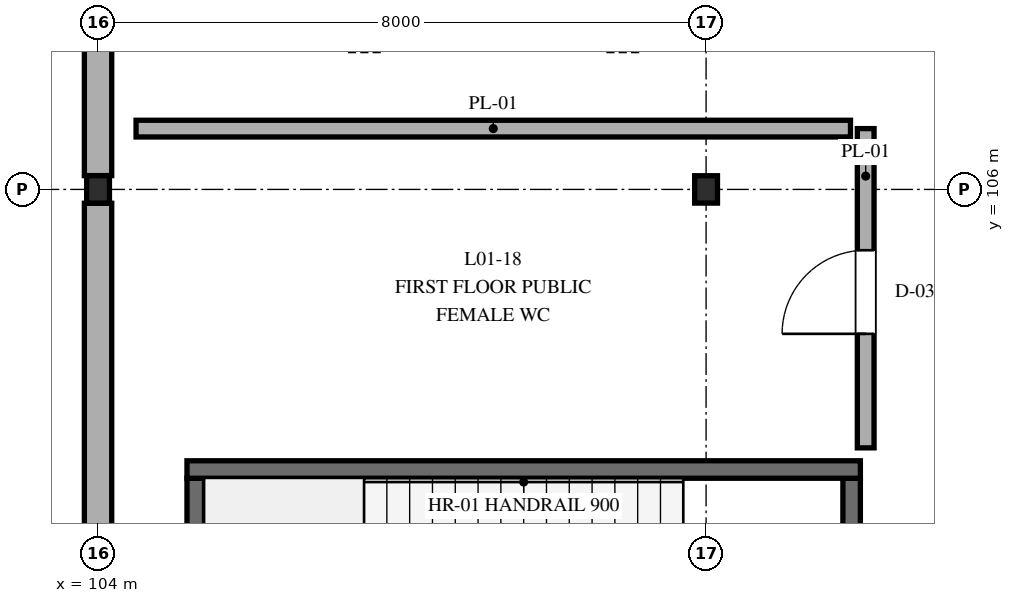
"""IFC4 building model, lengths in metres.
Left out: names, types, materials, properties, quantities, classifications, styles, units other than length and angle.
Written with IfcOpenShell. Run it as: python <this file> out.ifc"""

import sys

from ifc_helpers import new_model, si_unit, direction, frame, frame_2d, origin, origin_2d, place, context, subcontext, project, spatial, rectangle, i_section, extrude, element, fill, save


model = new_model("IFC4")
c1 = context("Model", 3, precision=1e-05, world=origin(), true_north=direction((0.0, 1.0)))
c2 = subcontext(c1, "Body", "Model", "MODEL_VIEW")
j1 = project(units=[si_unit("LENGTHUNIT", "METRE"), si_unit("PLANEANGLEUNIT", "RADIAN")], contexts=[c1])
p1 = place(None, origin())
s1 = spatial("IfcSite", under=j1, at=p1, CompositionType="ELEMENT")
p2 = place(p1, origin())
s2 = spatial("IfcBuilding", under=s1, at=p2, CompositionType="ELEMENT")
p3 = place(p2, frame((0.0, 0.0, 4.8)))
s3 = spatial("IfcBuildingStorey", under=s2, at=p3, CompositionType="ELEMENT", Elevation=4.8)
for number, where, z_axis, x_axis in (
    (1, (104.0, 106.0, 0.0), (0.0, 0.0, 1.0), (1.0, 0.0, 0.0)),
    (2, (112.0, 106.0, 0.0), (0.0, 0.0, 1.0), (1.0, 0.0, 0.0)),
):
    element("IfcColumn", number, at=place(p3, frame(where, z_axis=z_axis, x_axis=x_axis)), inside=s3, PredefinedType="COLUMN", context=c2, shape_type="SweptSolid", body=[
        extrude(i_section(OverallWidth=0.3, OverallDepth=0.36, WebThickness=0.012, FlangeThickness=0.022, FilletRadius=0.027, at=origin_2d()), origin(), (0.0, 0.0, 1.0), 4.8),
    ])
p4 = place(p3, frame((104.0, 105.818, 0.0), z_axis=(0.0, 0.0, 1.0), x_axis=(0.0, -1.0, 0.0)))
e3 = element("IfcWall", 3, at=p4, inside=s3, PredefinedType="STANDARD", context=c2, shape_type="SweptSolid", body=[
    extrude(rectangle(XDim=7.636, YDim=0.36, at=frame_2d((3.818, 0.0))), origin(), (0.0, 0.0, 1.0), 4.25),
])
p5 = place(p3, frame((104.0, 116.818, 0.0), z_axis=(0.0, 0.0, 1.0), x_axis=(0.0, -1.0, 0.0)))
e4 = element("IfcWall", 4, at=p5, inside=s3, PredefinedType="STANDARD", context=c2, shape_type="SweptSolid", body=[
    extrude(rectangle(XDim=10.636, YDim=0.36, at=frame_2d((5.318, 0.0))), origin(), (0.0, 0.0, 1.0), 4.25),
])
p6 = place(p3, frame((113.915, 97.9, 0.0), z_axis=(0.0, 0.0, 1.0), x_axis=(0.0, 1.0, 0.0)))
e5 = element("IfcWall", 5, at=p6, inside=s3, PredefinedType="SHEAR", context=c2, shape_type="SweptSolid", body=[
    extrude(rectangle(XDim=4.3, YDim=0.23, at=frame_2d((2.15, 0.0))), origin(), (0.0, 0.0, 1.0), 4.8),
])
p7 = place(p6, frame((1.425, 0.0, 0.0)))
e6 = element("IfcOpeningElement", 6, at=p7, cuts=e5, PredefinedType="OPENING", context=c2, shape_type="SweptSolid", body=[
    extrude(rectangle(XDim=1.45, YDim=2.2, at=frame_2d((0.725, 1.1))), frame((0.0, 0.125, 0.0), z_axis=(0.0, -1.0, 0.0), x_axis=(1.0, 0.0, 0.0)), (0.0, 0.0, 1.0), 0.25),
])
p8 = place(p3, frame((105.285, 102.2, 0.0), z_axis=(0.0, 0.0, 1.0), x_axis=(0.0, -1.0, 0.0)))
e7 = element("IfcWall", 7, at=p8, inside=s3, PredefinedType="SHEAR", context=c2, shape_type="SweptSolid", body=[
    extrude(rectangle(XDim=4.3, YDim=0.23, at=frame_2d((2.15, 0.0))), origin(), (0.0, 0.0, 1.0), 4.8),
])
p9 = place(p3, frame((114.03, 102.315, 0.0), z_axis=(0.0, 0.0, 1.0), x_axis=(-1.0, 0.0, 0.0)))
e8 = element("IfcWall", 8, at=p9, inside=s3, PredefinedType="SHEAR", context=c2, shape_type="SweptSolid", body=[
    extrude(rectangle(XDim=8.86, YDim=0.23, at=frame_2d((4.43, 0.0))), origin(), (0.0, 0.0, 1.0), 4.8),
])
p10 = place(p3, frame((114.1, 102.6, 0.0), z_axis=(0.0, 0.0, 1.0), x_axis=(0.0, 1.0, 0.0)))
e9 = element("IfcWall", 9, at=p10, inside=s3, PredefinedType="PLUMBINGWALL", context=c2, shape_type="SweptSolid", body=[
    extrude(rectangle(XDim=4.2, YDim=0.22, at=frame_2d((2.1, 0.0))), origin(), (0.0, 0.0, 1.0), 3.95),
])
p11 = place(p10, frame((1.5, 0.0, 0.0)))
e10 = element("IfcOpeningElement", 10, at=p11, cuts=e9, PredefinedType="OPENING", context=c2, shape_type="SweptSolid", body=[
    extrude(rectangle(XDim=1.1, YDim=2.2, at=frame_2d((0.55, 1.1))), frame((0.0, 0.12, 0.0), z_axis=(0.0, -1.0, 0.0), x_axis=(1.0, 0.0, 0.0)), (0.0, 0.0, 1.0), 0.24),
])
p12 = place(p3, frame((104.5, 106.8, 0.0), z_axis=(0.0, 0.0, 1.0), x_axis=(1.0, 0.0, 0.0)))
e11 = element("IfcWall", 11, at=p12, inside=s3, PredefinedType="PLUMBINGWALL", context=c2, shape_type="SweptSolid", body=[
    extrude(rectangle(XDim=9.4, YDim=0.22, at=frame_2d((4.7, 0.0))), origin(), (0.0, 0.0, 1.0), 3.95),
])
p13 = place(p11, origin())
e12 = element("IfcDoor", 12, at=p13, inside=s3, OperationType="SINGLE_SWING_LEFT", PredefinedType="DOOR", context=c2, shape_type="SweptSolid", body=[
    extrude(rectangle(XDim=1.1, YDim=2.2, at=frame_2d((0.55, 1.1))), frame((0.0, 0.025, 0.0), z_axis=(0.0, -1.0, 0.0), x_axis=(1.0, 0.0, 0.0)), (0.0, 0.0, 1.0), 0.05),
])
fill(e10, e12)
save(model, sys.argv[1])
